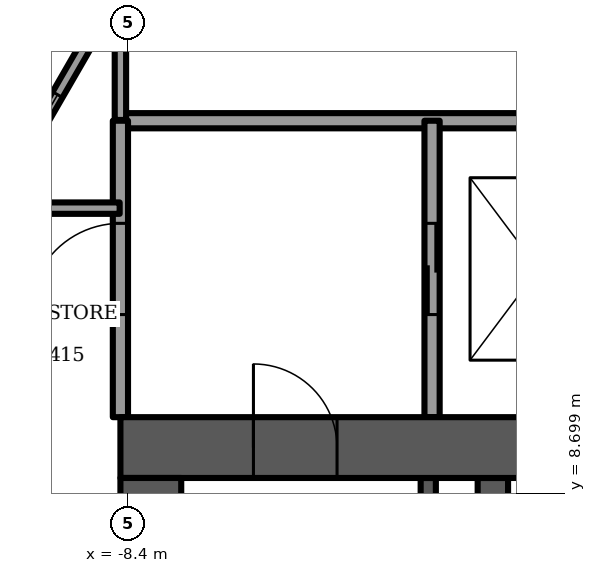
"""IFC4 building model, lengths in metres.
Left out: names, types, materials, properties, quantities, classifications, styles, units other than length and angle.
Written with IfcOpenShell. Run it as: python <this file> out.ifc"""

import sys

from ifc_helpers import new_model, si_unit, direction, frame, frame_2d, origin, place, context, subcontext, project, spatial, rectangle, extrude, element, fill, save


model = new_model("IFC4")
c1 = context("Model", 3, precision=1e-05, world=origin(), true_north=direction((0.0, 1.0)))
c2 = subcontext(c1, "Body", "Model", "MODEL_VIEW")
j1 = project(units=[si_unit("LENGTHUNIT", "METRE"), si_unit("PLANEANGLEUNIT", "RADIAN")], contexts=[c1])
p1 = place(None, origin())
s1 = spatial("IfcSite", under=j1, at=p1, CompositionType="ELEMENT")
p2 = place(p1, origin())
s2 = spatial("IfcBuilding", under=s1, at=p2, CompositionType="ELEMENT")
p3 = place(p2, frame((0.0, 0.0, 168.25)))
s3 = spatial("IfcBuildingStorey", under=s2, at=p3, CompositionType="ELEMENT", Elevation=168.25)
p4 = place(p3, frame((-8.5, 9.3, -0.3), z_axis=(0.0, 0.0, 1.0), x_axis=(1.0, 0.0, 0.0)))
e1 = element("IfcWall", 1, at=p4, inside=s3, PredefinedType="SHEAR", context=c2, shape_type="SweptSolid", body=[
    extrude(rectangle(XDim=17.0, YDim=0.8, at=frame_2d((8.5, 0.0))), origin(), (0.0, 0.0, 1.0), 3.75),
])
p5 = place(p4, frame((7.7, 0.0, 0.0)))
e2 = element("IfcOpeningElement", 2, at=p5, cuts=e1, PredefinedType="OPENING", context=c2, shape_type="SweptSolid", body=[
    extrude(rectangle(XDim=1.6, YDim=2.1, at=frame_2d((0.8, 1.05))), frame((0.0, 0.4, 0.0), z_axis=(0.0, -1.0, 0.0), x_axis=(1.0, 0.0, 0.0)), (0.0, 0.0, 1.0), 0.8),
])
p6 = place(p4, frame((1.75, 0.0, 0.0)))
e3 = element("IfcOpeningElement", 3, at=p6, cuts=e1, PredefinedType="OPENING", context=c2, shape_type="SweptSolid", body=[
    extrude(rectangle(XDim=1.1, YDim=2.1, at=frame_2d((0.55, 1.05))), frame((0.0, 0.4, 0.0), z_axis=(0.0, -1.0, 0.0), x_axis=(1.0, 0.0, 0.0)), (0.0, 0.0, 1.0), 0.8),
])
p7 = place(p4, frame((14.15, 0.0, 0.0)))
e4 = element("IfcOpeningElement", 4, at=p7, cuts=e1, PredefinedType="OPENING", context=c2, shape_type="SweptSolid", body=[
    extrude(rectangle(XDim=1.1, YDim=2.1, at=frame_2d((0.55, 1.05))), frame((0.0, 0.4, 0.0), z_axis=(0.0, -1.0, 0.0), x_axis=(1.0, 0.0, 0.0)), (0.0, 0.0, 1.0), 0.8),
])
p8 = place(p3, frame((-8.1, -0.9, -0.3), z_axis=(0.0, 0.0, 1.0), x_axis=(0.0, 1.0, 0.0)))
e5 = element("IfcWall", 5, at=p8, inside=s3, PredefinedType="SHEAR", context=c2, shape_type="SweptSolid", body=[
    extrude(rectangle(XDim=9.8, YDim=0.8, at=frame_2d((4.9, 0.0))), origin(), (0.0, 0.0, 1.0), 3.75),
])
p9 = place(p8, frame((8.15, 0.0, 0.0)))
e6 = element("IfcOpeningElement", 6, at=p9, cuts=e5, PredefinedType="OPENING", context=c2, shape_type="SweptSolid", body=[
    extrude(rectangle(XDim=1.1, YDim=2.1, at=frame_2d((0.55, 1.05))), frame((0.0, 0.4, 0.0), z_axis=(0.0, -1.0, 0.0), x_axis=(1.0, 0.0, 0.0)), (0.0, 0.0, 1.0), 0.8),
])
p10 = place(p3, frame((-3.6, -0.9, -0.3), z_axis=(0.0, 0.0, 1.0), x_axis=(0.0, 1.0, 0.0)))
e7 = element("IfcWall", 7, at=p10, inside=s3, PredefinedType="SHEAR", context=c2, shape_type="SweptSolid", body=[
    extrude(rectangle(XDim=9.8, YDim=0.4, at=frame_2d((4.9, 0.0))), origin(), (0.0, 0.0, 1.0), 3.75),
])
p11 = place(p3, frame((-7.393, 17.292, 0.0), z_axis=(0.0, 0.0, 1.0), x_axis=(-0.500001917853, -0.866024296509, 0.0)))
e8 = element("IfcWall", 8, at=p11, inside=s3, PredefinedType="SOLIDWALL", context=c2, shape_type="SweptSolid", body=[
    extrude(rectangle(XDim=19.788, YDim=0.15, at=frame_2d((9.894, 0.0))), origin(), (0.0, 0.0, 1.0), 3.45),
])
p12 = place(p11, frame((3.868, 0.0, 0.15)))
e9 = element("IfcOpeningElement", 9, at=p12, cuts=e8, PredefinedType="OPENING", context=c2, shape_type="SweptSolid", body=[
    extrude(rectangle(XDim=1.4, YDim=2.85, at=frame_2d((0.7, 1.425))), frame((0.0, 0.075, 0.0), z_axis=(0.0, -1.0, 0.0), x_axis=(1.0, 0.0, 0.0)), (0.0, 0.0, 1.0), 0.15),
])
p13 = place(p11, frame((10.067, 0.0, 0.15)))
e10 = element("IfcOpeningElement", 10, at=p13, cuts=e8, PredefinedType="OPENING", context=c2, shape_type="SweptSolid", body=[
    extrude(rectangle(XDim=0.9, YDim=2.85, at=frame_2d((0.45, 1.425))), frame((0.0, 0.075, 0.0), z_axis=(0.0, -1.0, 0.0), x_axis=(1.0, 0.0, 0.0)), (0.0, 0.0, 1.0), 0.15),
])
p14 = place(p11, frame((7.967, 0.0, 0.15)))
e11 = element("IfcOpeningElement", 11, at=p14, cuts=e8, PredefinedType="OPENING", context=c2, shape_type="SweptSolid", body=[
    extrude(rectangle(XDim=1.4, YDim=2.85, at=frame_2d((0.7, 1.425))), frame((0.0, 0.075, 0.0), z_axis=(0.0, -1.0, 0.0), x_axis=(1.0, 0.0, 0.0)), (0.0, 0.0, 1.0), 0.15),
])
p15 = place(p11, frame((13.779, 0.0, 0.0)))
e12 = element("IfcOpeningElement", 12, at=p15, cuts=e8, PredefinedType="OPENING", context=c2, shape_type="SweptSolid", body=[
    extrude(rectangle(XDim=1.4, YDim=2.4, at=frame_2d((0.7, 1.2))), frame((0.0, 0.075, 0.0), z_axis=(0.0, -1.0, 0.0), x_axis=(1.0, 0.0, 0.0)), (0.0, 0.0, 1.0), 0.15),
])
p16 = place(p11, frame((17.979, 0.0, 0.0)))
e13 = element("IfcOpeningElement", 13, at=p16, cuts=e8, PredefinedType="OPENING", context=c2, shape_type="SweptSolid", body=[
    extrude(rectangle(XDim=1.4, YDim=2.4, at=frame_2d((0.7, 1.2))), frame((0.0, 0.075, 0.0), z_axis=(0.0, -1.0, 0.0), x_axis=(1.0, 0.0, 0.0)), (0.0, 0.0, 1.0), 0.15),
])
p17 = place(p11, frame((0.168, 0.0, 0.15)))
e14 = element("IfcOpeningElement", 14, at=p17, cuts=e8, PredefinedType="OPENING", context=c2, shape_type="SweptSolid", body=[
    extrude(rectangle(XDim=1.6, YDim=2.73, at=frame_2d((0.8, 1.365))), frame((0.0, 0.075, 0.0), z_axis=(0.0, -1.0, 0.0), x_axis=(1.0, 0.0, 0.0)), (0.0, 0.0, 1.0), 0.15),
])
p18 = place(p3, frame((-4.45, 0.9, -0.3), z_axis=(0.0, 0.0, 1.0), x_axis=(0.0, 1.0, 0.0)))
e15 = element("IfcWall", 15, at=p18, inside=s3, PredefinedType="SOLIDWALL", context=c2, shape_type="SweptSolid", body=[
    extrude(rectangle(XDim=8.0, YDim=0.2, at=frame_2d((4.0, 0.0))), origin(), (0.0, 0.0, 1.0), 3.75),
])
p19 = place(p3, frame((-8.5, 13.6, 0.0), z_axis=(0.0, 0.0, 1.0), x_axis=(1.0, 0.0, 0.0)))
e16 = element("IfcWall", 16, at=p19, inside=s3, PredefinedType="PARTITIONING", context=c2, shape_type="SweptSolid", body=[
    extrude(rectangle(XDim=16.899, YDim=0.2, at=frame_2d((8.449, 0.0))), origin(), (0.0, 0.0, 1.0), 3.45),
])
p20 = place(p19, frame((8.0, 0.0, 0.0)))
e17 = element("IfcOpeningElement", 17, at=p20, cuts=e16, PredefinedType="OPENING", context=c2, shape_type="SweptSolid", body=[
    extrude(rectangle(XDim=1.0, YDim=2.1, at=frame_2d((0.5, 1.05))), frame((0.0, 0.1, 0.0), z_axis=(0.0, -1.0, 0.0), x_axis=(1.0, 0.0, 0.0)), (0.0, 0.0, 1.0), 0.2),
])
p21 = place(p3, frame((-8.5, 9.7, 0.0), z_axis=(0.0, 0.0, 1.0), x_axis=(0.0, 1.0, 0.0)))
e18 = element("IfcWall", 18, at=p21, inside=s3, PredefinedType="PARTITIONING", context=c2, shape_type="SweptSolid", body=[
    extrude(rectangle(XDim=3.9, YDim=0.2, at=frame_2d((1.95, 0.0))), origin(), (0.0, 0.0, 1.0), 3.45),
])
p22 = place(p21, frame((1.35, 0.0, 0.0)))
e19 = element("IfcOpeningElement", 19, at=p22, cuts=e18, PredefinedType="OPENING", context=c2, shape_type="SweptSolid", body=[
    extrude(rectangle(XDim=1.2, YDim=2.1, at=frame_2d((0.6, 1.05))), frame((0.0, 0.1, 0.0), z_axis=(0.0, -1.0, 0.0), x_axis=(1.0, 0.0, 0.0)), (0.0, 0.0, 1.0), 0.2),
])
p23 = place(p3, frame((-4.4, 9.7, 0.0), z_axis=(0.0, 0.0, 1.0), x_axis=(0.0, 1.0, 0.0)))
e20 = element("IfcWall", 20, at=p23, inside=s3, PredefinedType="PARTITIONING", context=c2, shape_type="SweptSolid", body=[
    extrude(rectangle(XDim=3.9, YDim=0.2, at=frame_2d((1.95, 0.0))), origin(), (0.0, 0.0, 1.0), 3.45),
])
p24 = place(p23, frame((1.35, 0.0, 0.0)))
e21 = element("IfcOpeningElement", 21, at=p24, cuts=e20, PredefinedType="OPENING", context=c2, shape_type="SweptSolid", body=[
    extrude(rectangle(XDim=1.2, YDim=2.1, at=frame_2d((0.6, 1.05))), frame((0.0, 0.1, 0.0), z_axis=(0.0, -1.0, 0.0), x_axis=(1.0, 0.0, 0.0)), (0.0, 0.0, 1.0), 0.2),
])
p25 = place(p3, frame((-10.241, 12.45, 0.0), z_axis=(0.0, 0.0, 1.0), x_axis=(1.0, 0.0, 0.0)))
e22 = element("IfcWall", 22, at=p25, inside=s3, PredefinedType="PARTITIONING", context=c2, shape_type="SweptSolid", body=[
    extrude(rectangle(XDim=1.731, YDim=0.15, at=frame_2d((0.865, 0.0))), origin(), (0.0, 0.0, 1.0), 3.45),
])
p26 = place(p3, frame((-8.5, 13.61, 0.0), z_axis=(0.0, 0.0, 1.0), x_axis=(0.0, 1.0, 0.0)))
e23 = element("IfcWall", 23, at=p26, inside=s3, PredefinedType="PARTITIONING", context=c2, shape_type="SweptSolid", body=[
    extrude(rectangle(XDim=1.855, YDim=0.15, at=frame_2d((0.927, 0.0))), origin(), (0.0, 0.0, 1.0), 3.45),
])
p27 = place(p12, origin())
e24 = element("IfcWindow", 24, at=p27, inside=s3, PartitioningType="SINGLE_PANEL", PredefinedType="WINDOW", context=c2, shape_type="SweptSolid", body=[
    extrude(rectangle(XDim=1.4, YDim=2.85, at=frame_2d((0.7, 1.425))), frame((0.0, 0.03, 0.0), z_axis=(0.0, -1.0, 0.0), x_axis=(1.0, 0.0, 0.0)), (0.0, 0.0, 1.0), 0.06),
])
fill(e9, e24)
p28 = place(p6, origin())
e25 = element("IfcDoor", 25, at=p28, inside=s3, OperationType="SINGLE_SWING_LEFT", PredefinedType="DOOR", context=c2, shape_type="SweptSolid", body=[
    extrude(rectangle(XDim=1.1, YDim=2.1, at=frame_2d((0.55, 1.05))), frame((0.0, 0.025, 0.0), z_axis=(0.0, -1.0, 0.0), x_axis=(1.0, 0.0, 0.0)), (0.0, 0.0, 1.0), 0.05),
])
fill(e3, e25)
p29 = place(p24, origin())
e26 = element("IfcDoor", 26, at=p29, inside=s3, OperationType="SLIDING_TO_LEFT", PredefinedType="DOOR", context=c2, shape_type="SweptSolid", body=[
    extrude(rectangle(XDim=1.2, YDim=2.1, at=frame_2d((0.6, 1.05))), frame((0.0, 0.025, 0.0), z_axis=(0.0, -1.0, 0.0), x_axis=(1.0, 0.0, 0.0)), (0.0, 0.0, 1.0), 0.05),
])
fill(e21, e26)
p30 = place(p22, origin())
e27 = element("IfcDoor", 27, at=p30, inside=s3, OperationType="SINGLE_SWING_LEFT", PredefinedType="DOOR", context=c2, shape_type="SweptSolid", body=[
    extrude(rectangle(XDim=1.2, YDim=2.1, at=frame_2d((0.6, 1.05))), frame((0.0, 0.025, 0.0), z_axis=(0.0, -1.0, 0.0), x_axis=(1.0, 0.0, 0.0)), (0.0, 0.0, 1.0), 0.05),
])
fill(e19, e27)
save(model, sys.argv[1])
